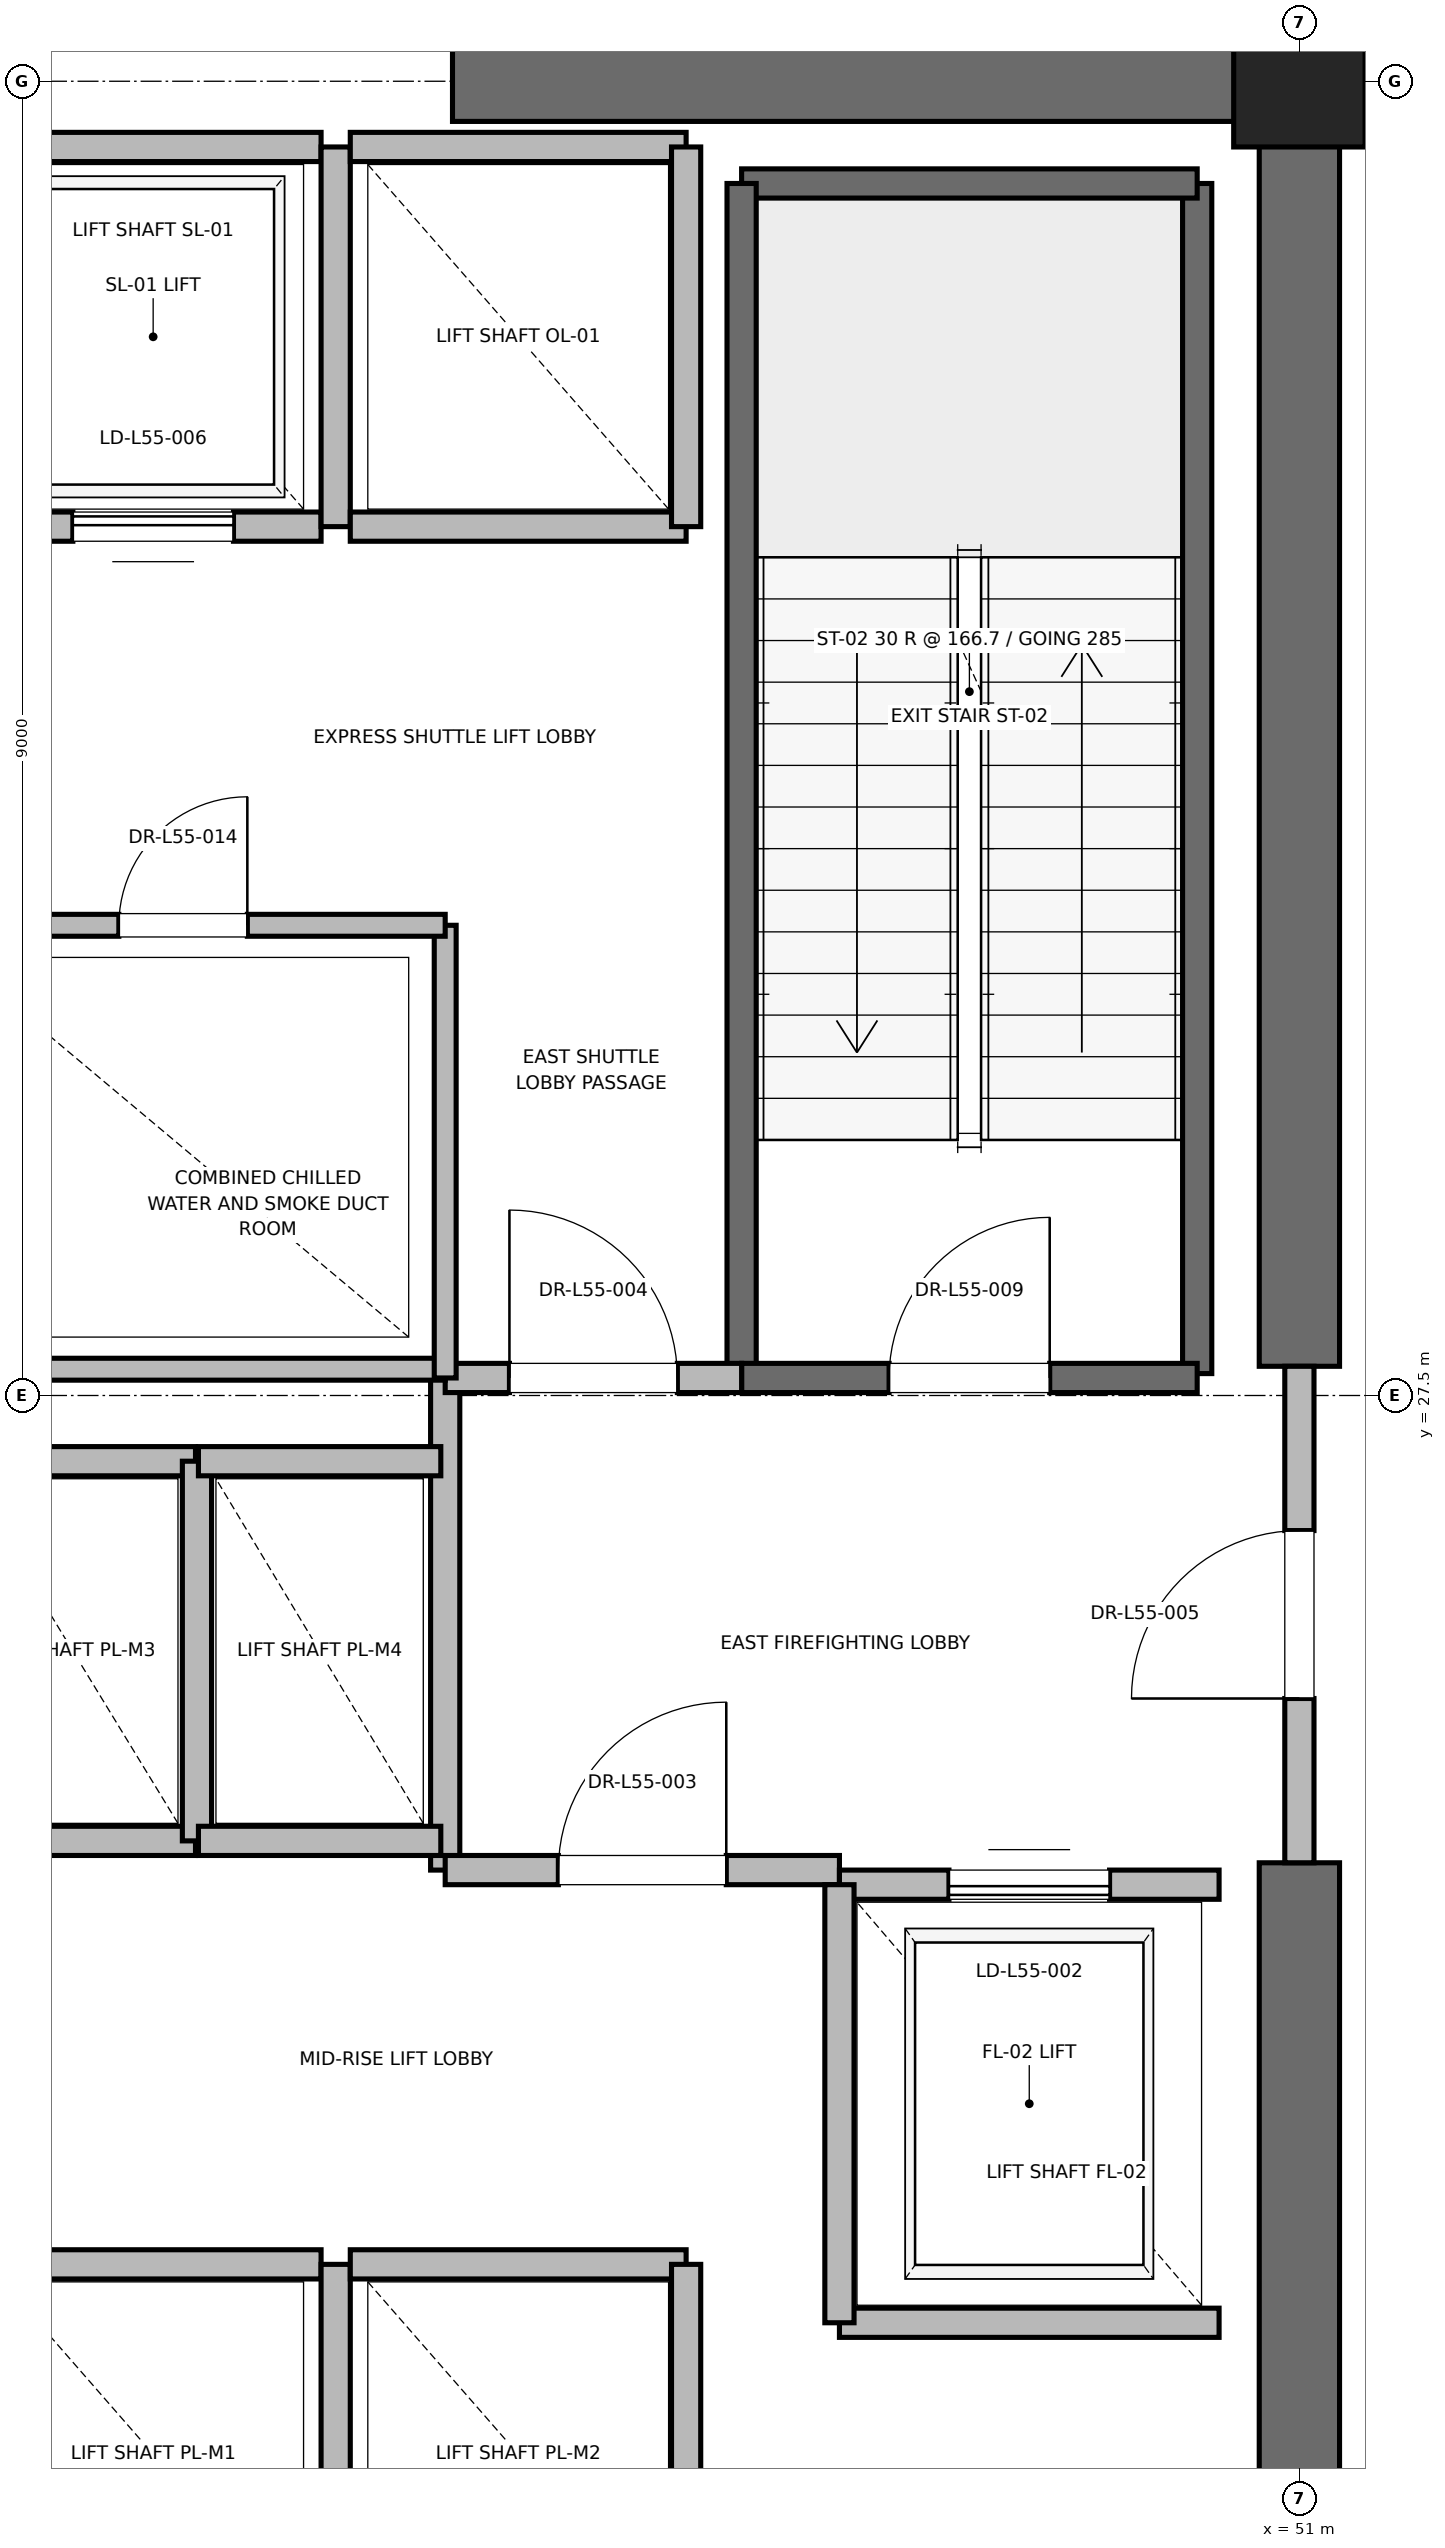
"""IFC4 building model, lengths in metres.
Left out: names, types, materials, properties, quantities, classifications, styles, units other than length and angle.
Written with IfcOpenShell. Run it as: python <this file> out.ifc"""

import sys

from ifc_helpers import new_model, si_unit, direction, frame, frame_2d, origin, origin_2d, place, context, subcontext, project, spatial, rectangle, extrude, element, fill, save


model = new_model("IFC4")
c1 = context("Model", 3, precision=1e-05, world=origin(), true_north=direction((0.0, 1.0)))
c2 = subcontext(c1, "Body", "Model", "MODEL_VIEW")
j1 = project(units=[si_unit("LENGTHUNIT", "METRE"), si_unit("PLANEANGLEUNIT", "RADIAN")], contexts=[c1])
p1 = place(None, origin())
s1 = spatial("IfcSite", under=j1, at=p1, CompositionType="ELEMENT")
p2 = place(p1, origin())
s2 = spatial("IfcBuilding", under=s1, at=p2, CompositionType="ELEMENT")
p3 = place(p2, frame((0.0, 0.0, 238.2)))
s3 = spatial("IfcBuildingStorey", under=s2, at=p3, CompositionType="ELEMENT", Elevation=238.2)
p4 = place(p3, frame((51.0, 36.5, 0.0), z_axis=(0.0, 0.0, 1.0), x_axis=(1.0, 0.0, 0.0)))
e1 = element("IfcColumn", 1, at=p4, inside=s3, PredefinedType="PILASTER", context=c2, shape_type="SweptSolid", body=[
    extrude(rectangle(XDim=0.9, YDim=0.9, at=origin_2d()), origin(), (0.0, 0.0, 1.0), 5.0),
])
for number, where, z_axis, x_axis in (
    (2, (45.2, 36.5, 0.0), (0.0, 0.0, 1.0), (1.0, 0.0, 0.0)),
    (3, (51.0, 18.5, 0.0), (0.0, 0.0, 1.0), (0.0, 1.0, 0.0)),
):
    element("IfcWall", number, at=place(p3, frame(where, z_axis=z_axis, x_axis=x_axis)), inside=s3, PredefinedType="SHEAR", context=c2, shape_type="SweptSolid", body=[
        extrude(rectangle(XDim=5.8, YDim=0.55, at=frame_2d((2.9, 0.0))), origin(), (0.0, 0.0, 1.0), 4.785),
    ])
p5 = place(p3, frame((51.0, 27.7, 0.0), z_axis=(0.0, 0.0, 1.0), x_axis=(0.0, 1.0, 0.0)))
e4 = element("IfcWall", 4, at=p5, inside=s3, PredefinedType="SHEAR", context=c2, shape_type="SweptSolid", body=[
    extrude(rectangle(XDim=8.8, YDim=0.55, at=frame_2d((4.4, 0.0))), origin(), (0.0, 0.0, 1.0), 4.785),
])
p6 = place(p3, frame((50.3, 27.65, 0.0), z_axis=(0.0, 0.0, 1.0), x_axis=(0.0, 1.0, 0.0)))
e5 = element("IfcWall", 5, at=p6, inside=s3, PredefinedType="SOLIDWALL", context=c2, shape_type="SweptSolid", body=[
    extrude(rectangle(XDim=8.15, YDim=0.2, at=frame_2d((4.075, 0.0))), origin(), (0.0, 0.0, 1.0), 4.785),
])
p7 = place(p3, frame((47.18, 35.8, 0.0), z_axis=(0.0, 0.0, 1.0), x_axis=(1.0, 0.0, 0.0)))
e6 = element("IfcWall", 6, at=p7, inside=s3, PredefinedType="SOLIDWALL", context=c2, shape_type="SweptSolid", body=[
    extrude(rectangle(XDim=3.12, YDim=0.2, at=frame_2d((1.56, 0.0))), origin(), (0.0, 0.0, 1.0), 4.785),
])
p8 = place(p3, frame((47.18, 27.62, 0.0), z_axis=(0.0, 0.0, 1.0), x_axis=(0.0, 1.0, 0.0)))
e7 = element("IfcWall", 7, at=p8, inside=s3, PredefinedType="SOLIDWALL", context=c2, shape_type="SweptSolid", body=[
    extrude(rectangle(XDim=8.18, YDim=0.2, at=frame_2d((4.09, 0.0))), origin(), (0.0, 0.0, 1.0), 4.785),
])
p9 = place(p3, frame((47.18, 27.62, 0.0), z_axis=(0.0, 0.0, 1.0), x_axis=(1.0, 0.0, 0.0)))
e8 = element("IfcWall", 8, at=p9, inside=s3, PredefinedType="SOLIDWALL", context=c2, shape_type="SweptSolid", body=[
    extrude(rectangle(XDim=3.12, YDim=0.2, at=frame_2d((1.56, 0.0))), origin(), (0.0, 0.0, 1.0), 4.785),
])
p10 = place(p9, frame((1.01, 0.0, 0.0)))
e9 = element("IfcOpeningElement", 9, at=p10, cuts=e8, PredefinedType="OPENING", context=c2, shape_type="SweptSolid", body=[
    extrude(rectangle(XDim=1.1, YDim=2.15, at=frame_2d((0.55, 1.075))), frame((0.0, 0.1, 0.0), z_axis=(0.0, -1.0, 0.0), x_axis=(1.0, 0.0, 0.0)), (0.0, 0.0, 1.0), 0.2),
])
p11 = place(p3, frame((45.15, 24.25, 0.0), z_axis=(0.0, 0.0, 1.0), x_axis=(0.0, 1.0, 0.0)))
e10 = element("IfcWall", 10, at=p11, inside=s3, PredefinedType="PARTITIONING", context=c2, shape_type="SweptSolid", body=[
    extrude(rectangle(XDim=3.37, YDim=0.2, at=frame_2d((1.685, 0.0))), origin(), (0.0, 0.0, 1.0), 4.785),
])
p12 = place(p3, frame((45.15, 24.25, 0.0), z_axis=(0.0, 0.0, 1.0), x_axis=(1.0, 0.0, 0.0)))
e11 = element("IfcWall", 11, at=p12, inside=s3, PredefinedType="PARTITIONING", context=c2, shape_type="SweptSolid", body=[
    extrude(rectangle(XDim=2.7, YDim=0.2, at=frame_2d((1.35, 0.0))), origin(), (0.0, 0.0, 1.0), 4.785),
])
p13 = place(p12, frame((0.775, 0.0, 0.0)))
e12 = element("IfcOpeningElement", 12, at=p13, cuts=e11, PredefinedType="OPENING", context=c2, shape_type="SweptSolid", body=[
    extrude(rectangle(XDim=1.15, YDim=2.2, at=frame_2d((0.575, 1.1))), frame((0.0, 0.1, 0.0), z_axis=(0.0, -1.0, 0.0), x_axis=(1.0, 0.0, 0.0)), (0.0, 0.0, 1.0), 0.2),
])
p14 = place(p3, frame((45.15, 27.62, 0.0), z_axis=(0.0, 0.0, 1.0), x_axis=(1.0, 0.0, 0.0)))
e13 = element("IfcWall", 13, at=p14, inside=s3, PredefinedType="PARTITIONING", context=c2, shape_type="SweptSolid", body=[
    extrude(rectangle(XDim=2.03, YDim=0.2, at=frame_2d((1.015, 0.0))), origin(), (0.0, 0.0, 1.0), 4.785),
])
p15 = place(p14, frame((0.44, 0.0, 0.0)))
e14 = element("IfcOpeningElement", 14, at=p15, cuts=e13, PredefinedType="OPENING", context=c2, shape_type="SweptSolid", body=[
    extrude(rectangle(XDim=1.15, YDim=2.2, at=frame_2d((0.575, 1.1))), frame((0.0, 0.1, 0.0), z_axis=(0.0, -1.0, 0.0), x_axis=(1.0, 0.0, 0.0)), (0.0, 0.0, 1.0), 0.2),
])
p16 = place(p3, frame((51.0, 24.3, 0.0), z_axis=(0.0, 0.0, 1.0), x_axis=(0.0, 1.0, 0.0)))
e15 = element("IfcWall", 15, at=p16, inside=s3, PredefinedType="PARTITIONING", context=c2, shape_type="SweptSolid", body=[
    extrude(rectangle(XDim=3.4, YDim=0.2, at=frame_2d((1.7, 0.0))), origin(), (0.0, 0.0, 1.0), 3.765),
])
p17 = place(p16, frame((1.125, 0.0, 0.0)))
e16 = element("IfcOpeningElement", 16, at=p17, cuts=e15, PredefinedType="OPENING", context=c2, shape_type="SweptSolid", body=[
    extrude(rectangle(XDim=1.15, YDim=2.2, at=frame_2d((0.575, 1.1))), frame((0.0, 0.1, 0.0), z_axis=(0.0, -1.0, 0.0), x_axis=(1.0, 0.0, 0.0)), (0.0, 0.0, 1.0), 0.2),
])
p18 = place(p3, frame((47.85, 21.15, 0.0), z_axis=(0.0, 0.0, 1.0), x_axis=(1.0, 0.0, 0.0)))
e17 = element("IfcWall", 17, at=p18, inside=s3, PredefinedType="SOLIDWALL", context=c2, shape_type="SweptSolid", body=[
    extrude(rectangle(XDim=2.6, YDim=0.2, at=frame_2d((1.3, 0.0))), origin(), (0.0, 0.0, 1.0), 4.785),
])
p19 = place(p3, frame((50.45, 24.15, 0.0), z_axis=(0.0, 0.0, 1.0), x_axis=(-1.0, 0.0, 0.0)))
e18 = element("IfcWall", 18, at=p19, inside=s3, PredefinedType="SOLIDWALL", context=c2, shape_type="SweptSolid", body=[
    extrude(rectangle(XDim=2.6, YDim=0.2, at=frame_2d((1.3, 0.0))), origin(), (0.0, 0.0, 1.0), 3.765),
])
p20 = place(p19, frame((0.75, 0.0, 0.0)))
e19 = element("IfcOpeningElement", 19, at=p20, cuts=e18, PredefinedType="OPENING", context=c2, shape_type="SweptSolid", body=[
    extrude(rectangle(XDim=1.1, YDim=2.2, at=frame_2d((0.55, 1.1))), frame((0.0, 0.1, 0.0), z_axis=(0.0, -1.0, 0.0), x_axis=(1.0, 0.0, 0.0)), (0.0, 0.0, 1.0), 0.2),
])
p21 = place(p3, frame((47.85, 24.15, 0.0), z_axis=(0.0, 0.0, 1.0), x_axis=(0.0, -1.0, 0.0)))
e20 = element("IfcWall", 20, at=p21, inside=s3, PredefinedType="SOLIDWALL", context=c2, shape_type="SweptSolid", body=[
    extrude(rectangle(XDim=3.0, YDim=0.2, at=frame_2d((1.5, 0.0))), origin(), (0.0, 0.0, 1.0), 4.785),
])
p22 = place(p3, frame((44.3, 21.55, 0.0), z_axis=(0.0, 0.0, 1.0), x_axis=(-1.0, 0.0, 0.0)))
e21 = element("IfcWall", 21, at=p22, inside=s3, PredefinedType="SOLIDWALL", context=c2, shape_type="SweptSolid", body=[
    extrude(rectangle(XDim=2.3, YDim=0.2, at=frame_2d((1.15, 0.0))), origin(), (0.0, 0.0, 1.0), 4.785),
])
p23 = place(p3, frame((44.4, 18.95, 0.0), z_axis=(0.0, 0.0, 1.0), x_axis=(0.0, 1.0, 0.0)))
e22 = element("IfcWall", 22, at=p23, inside=s3, PredefinedType="SOLIDWALL", context=c2, shape_type="SweptSolid", body=[
    extrude(rectangle(XDim=2.6, YDim=0.2, at=frame_2d((1.3, 0.0))), origin(), (0.0, 0.0, 1.0), 4.785),
])
p24 = place(p3, frame((46.8, 21.55, 0.0), z_axis=(0.0, 0.0, 1.0), x_axis=(-1.0, 0.0, 0.0)))
e23 = element("IfcWall", 23, at=p24, inside=s3, PredefinedType="SOLIDWALL", context=c2, shape_type="SweptSolid", body=[
    extrude(rectangle(XDim=2.3, YDim=0.2, at=frame_2d((1.15, 0.0))), origin(), (0.0, 0.0, 1.0), 4.785),
])
p25 = place(p3, frame((46.8, 18.95, 0.0), z_axis=(0.0, 0.0, 1.0), x_axis=(0.0, 1.0, 0.0)))
e24 = element("IfcWall", 24, at=p25, inside=s3, PredefinedType="SOLIDWALL", context=c2, shape_type="SweptSolid", body=[
    extrude(rectangle(XDim=2.6, YDim=0.2, at=frame_2d((1.3, 0.0))), origin(), (0.0, 0.0, 1.0), 4.785),
])
for number, where, z_axis, x_axis in (
    (25, (41.76, 24.45, 0.0), (0.0, 0.0, 1.0), (1.0, 0.0, 0.0)),
    (26, (43.44, 27.05, 0.0), (0.0, 0.0, 1.0), (-1.0, 0.0, 0.0)),
):
    element("IfcWall", number, at=place(p3, frame(where, z_axis=z_axis, x_axis=x_axis)), inside=s3, PredefinedType="SOLIDWALL", context=c2, shape_type="SweptSolid", body=[
        extrude(rectangle(XDim=1.68, YDim=0.2, at=frame_2d((0.84, 0.0))), origin(), (0.0, 0.0, 1.0), 4.785),
    ])
p26 = place(p3, frame((43.45, 24.45, 0.0), z_axis=(0.0, 0.0, 1.0), x_axis=(0.0, 1.0, 0.0)))
e27 = element("IfcWall", 27, at=p26, inside=s3, PredefinedType="SOLIDWALL", context=c2, shape_type="SweptSolid", body=[
    extrude(rectangle(XDim=2.6, YDim=0.2, at=frame_2d((1.3, 0.0))), origin(), (0.0, 0.0, 1.0), 4.785),
])
for number, where, z_axis, x_axis in (
    (28, (43.46, 24.45, 0.0), (0.0, 0.0, 1.0), (1.0, 0.0, 0.0)),
    (29, (45.12, 27.05, 0.0), (0.0, 0.0, 1.0), (-1.0, 0.0, 0.0)),
):
    element("IfcWall", number, at=place(p3, frame(where, z_axis=z_axis, x_axis=x_axis)), inside=s3, PredefinedType="SOLIDWALL", context=c2, shape_type="SweptSolid", body=[
        extrude(rectangle(XDim=1.66, YDim=0.2, at=frame_2d((0.83, 0.0))), origin(), (0.0, 0.0, 1.0), 4.785),
    ])
p27 = place(p3, frame((42.0, 33.45, 0.0), z_axis=(0.0, 0.0, 1.0), x_axis=(1.0, 0.0, 0.0)))
e30 = element("IfcWall", 30, at=p27, inside=s3, PredefinedType="SOLIDWALL", context=c2, shape_type="SweptSolid", body=[
    extrude(rectangle(XDim=2.3, YDim=0.2, at=frame_2d((1.15, 0.0))), origin(), (0.0, 0.0, 1.0), 4.785),
])
p28 = place(p27, frame((0.6, 0.0, 0.0)))
e31 = element("IfcOpeningElement", 31, at=p28, cuts=e30, PredefinedType="OPENING", context=c2, shape_type="SweptSolid", body=[
    extrude(rectangle(XDim=1.1, YDim=2.2, at=frame_2d((0.55, 1.1))), frame((0.0, 0.1, 0.0), z_axis=(0.0, -1.0, 0.0), x_axis=(1.0, 0.0, 0.0)), (0.0, 0.0, 1.0), 0.2),
])
p29 = place(p3, frame((44.3, 36.05, 0.0), z_axis=(0.0, 0.0, 1.0), x_axis=(-1.0, 0.0, 0.0)))
e32 = element("IfcWall", 32, at=p29, inside=s3, PredefinedType="SOLIDWALL", context=c2, shape_type="SweptSolid", body=[
    extrude(rectangle(XDim=2.3, YDim=0.2, at=frame_2d((1.15, 0.0))), origin(), (0.0, 0.0, 1.0), 3.765),
])
p30 = place(p3, frame((44.4, 33.45, 0.0), z_axis=(0.0, 0.0, 1.0), x_axis=(0.0, 1.0, 0.0)))
e33 = element("IfcWall", 33, at=p30, inside=s3, PredefinedType="SOLIDWALL", context=c2, shape_type="SweptSolid", body=[
    extrude(rectangle(XDim=2.6, YDim=0.2, at=frame_2d((1.3, 0.0))), origin(), (0.0, 0.0, 1.0), 3.765),
])
p31 = place(p3, frame((44.5, 33.45, 0.0), z_axis=(0.0, 0.0, 1.0), x_axis=(1.0, 0.0, 0.0)))
e34 = element("IfcWall", 34, at=p31, inside=s3, PredefinedType="SOLIDWALL", context=c2, shape_type="SweptSolid", body=[
    extrude(rectangle(XDim=2.3, YDim=0.2, at=frame_2d((1.15, 0.0))), origin(), (0.0, 0.0, 1.0), 4.785),
])
p32 = place(p3, frame((46.8, 36.05, 0.0), z_axis=(0.0, 0.0, 1.0), x_axis=(-1.0, 0.0, 0.0)))
e35 = element("IfcWall", 35, at=p32, inside=s3, PredefinedType="SOLIDWALL", context=c2, shape_type="SweptSolid", body=[
    extrude(rectangle(XDim=2.3, YDim=0.2, at=frame_2d((1.15, 0.0))), origin(), (0.0, 0.0, 1.0), 3.765),
])
p33 = place(p3, frame((46.8, 33.45, 0.0), z_axis=(0.0, 0.0, 1.0), x_axis=(0.0, 1.0, 0.0)))
e36 = element("IfcWall", 36, at=p33, inside=s3, PredefinedType="SOLIDWALL", context=c2, shape_type="SweptSolid", body=[
    extrude(rectangle(XDim=2.6, YDim=0.2, at=frame_2d((1.3, 0.0))), origin(), (0.0, 0.0, 1.0), 4.785),
])
p34 = place(p3, frame((41.56, 27.68, 0.0), z_axis=(0.0, 0.0, 1.0), x_axis=(1.0, 0.0, 0.0)))
e37 = element("IfcWall", 37, at=p34, inside=s3, PredefinedType="PARTITIONING", context=c2, shape_type="SweptSolid", body=[
    extrude(rectangle(XDim=3.59, YDim=0.15, at=frame_2d((1.795, 0.0))), origin(), (0.0, 0.0, 1.0), 2.85),
])
p35 = place(p3, frame((45.15, 27.62, 0.0), z_axis=(0.0, 0.0, 1.0), x_axis=(0.0, 1.0, 0.0)))
e38 = element("IfcWall", 38, at=p35, inside=s3, PredefinedType="PARTITIONING", context=c2, shape_type="SweptSolid", body=[
    extrude(rectangle(XDim=3.1, YDim=0.15, at=frame_2d((1.55, 0.0))), origin(), (0.0, 0.0, 1.0), 2.85),
])
p36 = place(p3, frame((41.56, 30.72, 0.0), z_axis=(0.0, 0.0, 1.0), x_axis=(1.0, 0.0, 0.0)))
e39 = element("IfcWall", 39, at=p36, inside=s3, PredefinedType="PARTITIONING", context=c2, shape_type="SweptSolid", body=[
    extrude(rectangle(XDim=3.59, YDim=0.15, at=frame_2d((1.795, 0.0))), origin(), (0.0, 0.0, 1.0), 2.85),
])
p37 = place(p36, frame((1.355, 0.0, 0.0)))
e40 = element("IfcOpeningElement", 40, at=p37, cuts=e39, PredefinedType="OPENING", context=c2, shape_type="SweptSolid", body=[
    extrude(rectangle(XDim=0.88, YDim=2.1, at=frame_2d((0.44, 1.05))), frame((0.0, 0.075, 0.0), z_axis=(0.0, -1.0, 0.0), x_axis=(1.0, 0.0, 0.0)), (0.0, 0.0, 1.0), 0.15),
])
p38 = place(p10, origin())
e41 = element("IfcDoor", 41, at=p38, inside=s3, OperationType="SINGLE_SWING_RIGHT", PredefinedType="DOOR", context=c2, shape_type="SweptSolid", body=[
    extrude(rectangle(XDim=1.1, YDim=2.15, at=frame_2d((0.55, 1.075))), frame((0.0, 0.025, 0.0), z_axis=(0.0, -1.0, 0.0), x_axis=(1.0, 0.0, 0.0)), (0.0, 0.0, 1.0), 0.05),
])
fill(e9, e41)
p39 = place(p13, origin())
e42 = element("IfcDoor", 42, at=p39, inside=s3, OperationType="SINGLE_SWING_RIGHT", PredefinedType="DOOR", context=c2, shape_type="SweptSolid", body=[
    extrude(rectangle(XDim=1.15, YDim=2.2, at=frame_2d((0.575, 1.1))), frame((0.0, 0.025, 0.0), z_axis=(0.0, -1.0, 0.0), x_axis=(1.0, 0.0, 0.0)), (0.0, 0.0, 1.0), 0.05),
])
fill(e12, e42)
p40 = place(p15, origin())
e43 = element("IfcDoor", 43, at=p40, inside=s3, OperationType="SINGLE_SWING_LEFT", PredefinedType="DOOR", context=c2, shape_type="SweptSolid", body=[
    extrude(rectangle(XDim=1.15, YDim=2.2, at=frame_2d((0.575, 1.1))), frame((0.0, 0.025, 0.0), z_axis=(0.0, -1.0, 0.0), x_axis=(1.0, 0.0, 0.0)), (0.0, 0.0, 1.0), 0.05),
])
fill(e14, e43)
p41 = place(p17, origin())
e44 = element("IfcDoor", 44, at=p41, inside=s3, OperationType="SINGLE_SWING_LEFT", PredefinedType="DOOR", context=c2, shape_type="SweptSolid", body=[
    extrude(rectangle(XDim=1.15, YDim=2.2, at=frame_2d((0.575, 1.1))), frame((0.0, 0.025, 0.0), z_axis=(0.0, -1.0, 0.0), x_axis=(1.0, 0.0, 0.0)), (0.0, 0.0, 1.0), 0.05),
])
fill(e16, e44)
p42 = place(p20, origin())
e45 = element("IfcDoor", 45, at=p42, inside=s3, OperationType="SLIDING_TO_RIGHT", PredefinedType="DOOR", context=c2, shape_type="SweptSolid", body=[
    extrude(rectangle(XDim=1.1, YDim=2.2, at=frame_2d((0.55, 1.1))), frame((0.0, 0.025, 0.0), z_axis=(0.0, -1.0, 0.0), x_axis=(1.0, 0.0, 0.0)), (0.0, 0.0, 1.0), 0.05),
])
fill(e19, e45)
p43 = place(p28, origin())
e46 = element("IfcDoor", 46, at=p43, inside=s3, OperationType="SLIDING_TO_RIGHT", PredefinedType="DOOR", context=c2, shape_type="SweptSolid", body=[
    extrude(rectangle(XDim=1.1, YDim=2.2, at=frame_2d((0.55, 1.1))), frame((0.0, 0.025, 0.0), z_axis=(0.0, -1.0, 0.0), x_axis=(1.0, 0.0, 0.0)), (0.0, 0.0, 1.0), 0.05),
])
fill(e31, e46)
p44 = place(p37, origin())
e47 = element("IfcDoor", 47, at=p44, inside=s3, OperationType="SINGLE_SWING_RIGHT", PredefinedType="DOOR", context=c2, shape_type="SweptSolid", body=[
    extrude(rectangle(XDim=0.88, YDim=2.1, at=frame_2d((0.44, 1.05))), frame((0.0, 0.025, 0.0), z_axis=(0.0, -1.0, 0.0), x_axis=(1.0, 0.0, 0.0)), (0.0, 0.0, 1.0), 0.05),
])
fill(e40, e47)
save(model, sys.argv[1])
